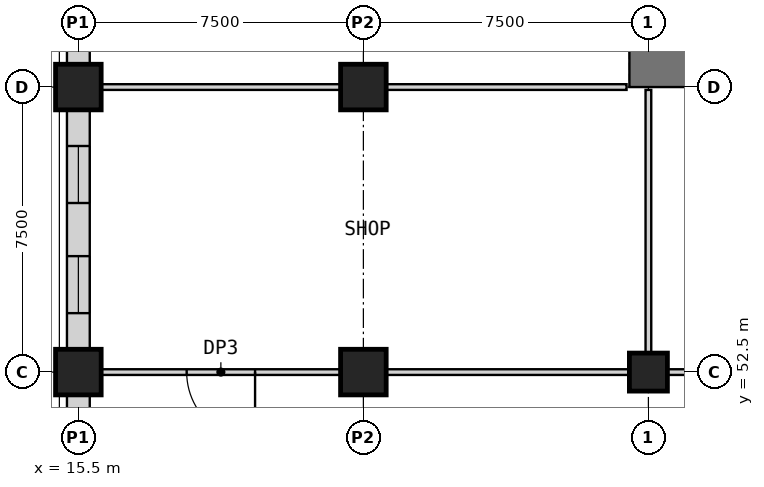
"""IFC4 building model, lengths in metres.
Left out: names, types, materials, properties, quantities, classifications, styles, units other than length and angle.
Written with IfcOpenShell. Run it as: python <this file> out.ifc"""

import sys

from ifc_helpers import new_model, si_unit, direction, frame, frame_2d, origin, origin_2d, place, context, subcontext, project, spatial, rectangle, extrude, element, fill, save


model = new_model("IFC4")
c1 = context("Model", 3, precision=1e-05, world=origin(), true_north=direction((0.0, 1.0)))
c2 = subcontext(c1, "Body", "Model", "MODEL_VIEW")
j1 = project(units=[si_unit("LENGTHUNIT", "METRE"), si_unit("PLANEANGLEUNIT", "RADIAN")], contexts=[c1])
p1 = place(None, origin())
s1 = spatial("IfcSite", under=j1, at=p1, CompositionType="ELEMENT")
p2 = place(p1, origin())
s2 = spatial("IfcBuilding", under=s1, at=p2, CompositionType="ELEMENT")
p3 = place(p2, frame((0.0, 0.0, 8.0)))
s3 = spatial("IfcBuildingStorey", under=s2, at=p3, CompositionType="ELEMENT", Elevation=8.0)
p4 = place(p3, frame((30.5, 52.5, 0.0), z_axis=(0.0, 0.0, 1.0), x_axis=(1.0, 0.0, 0.0)))
e1 = element("IfcColumn", 1, at=p4, inside=s3, PredefinedType="COLUMN", context=c2, shape_type="SweptSolid", body=[
    extrude(rectangle(XDim=1.0, YDim=1.0, at=origin_2d()), origin(), (0.0, 0.0, 1.0), 5.5),
])
for number, where, z_axis, x_axis in (
    (2, (15.5, 52.5, 0.0), (0.0, 0.0, 1.0), (1.0, 0.0, 0.0)),
    (3, (15.5, 60.0, 0.0), (0.0, 0.0, 1.0), (1.0, 0.0, 0.0)),
    (4, (23.0, 52.5, 0.0), (0.0, 0.0, 1.0), (1.0, 0.0, 0.0)),
    (5, (23.0, 60.0, 0.0), (0.0, 0.0, 1.0), (1.0, 0.0, 0.0)),
):
    element("IfcColumn", number, at=place(p3, frame(where, z_axis=z_axis, x_axis=x_axis)), inside=s3, PredefinedType="COLUMN", context=c2, shape_type="SweptSolid", body=[
        extrude(rectangle(XDim=1.2, YDim=1.2, at=origin_2d()), origin(), (0.0, 0.0, 1.0), 5.5),
    ])
p5 = place(p3, frame((30.0, 60.5, 0.0), z_axis=(0.0, 0.0, 1.0), x_axis=(1.0, 0.0, 0.0)))
e6 = element("IfcWall", 6, at=p5, inside=s3, PredefinedType="SHEAR", context=c2, shape_type="SweptSolid", body=[
    extrude(rectangle(XDim=30.0, YDim=1.0, at=frame_2d((15.0, 0.0))), origin(), (0.0, 0.0, 1.0), 5.5),
])
p6 = place(p5, frame((21.9, 0.0, 0.0)))
e7 = element("IfcOpeningElement", 7, at=p6, cuts=e6, PredefinedType="OPENING", context=c2, shape_type="SweptSolid", body=[
    extrude(rectangle(XDim=1.8, YDim=2.1, at=frame_2d((0.9, 1.05))), frame((0.0, 0.51, 0.0), z_axis=(0.0, -1.0, 0.0), x_axis=(1.0, 0.0, 0.0)), (0.0, 0.0, 1.0), 1.02),
])
p7 = place(p5, frame((26.5, 0.0, 0.0)))
e8 = element("IfcOpeningElement", 8, at=p7, cuts=e6, PredefinedType="OPENING", context=c2, shape_type="SweptSolid", body=[
    extrude(rectangle(XDim=1.2, YDim=2.1, at=frame_2d((0.6, 1.05))), frame((0.0, 0.51, 0.0), z_axis=(0.0, -1.0, 0.0), x_axis=(1.0, 0.0, 0.0)), (0.0, 0.0, 1.0), 1.02),
])
p8 = place(p3, frame((22.4, 52.5, 0.0), z_axis=(0.0, 0.0, 1.0), x_axis=(-1.0, 0.0, 0.0)))
e9 = element("IfcWall", 9, at=p8, inside=s3, PredefinedType="PARTITIONING", context=c2, shape_type="SweptSolid", body=[
    extrude(rectangle(XDim=6.3, YDim=0.15, at=frame_2d((3.15, 0.0))), origin(), (0.0, 0.0, 1.0), 5.2),
])
p9 = place(p8, frame((2.25, 0.0, 0.0)))
e10 = element("IfcOpeningElement", 10, at=p9, cuts=e9, PredefinedType="OPENING", context=c2, shape_type="SweptSolid", body=[
    extrude(rectangle(XDim=1.8, YDim=2.4, at=frame_2d((0.9, 1.2))), frame((0.0, 0.085, 0.0), z_axis=(0.0, -1.0, 0.0), x_axis=(1.0, 0.0, 0.0)), (0.0, 0.0, 1.0), 0.17),
])
p10 = place(p3, frame((23.6, 52.5, 0.0), z_axis=(0.0, 0.0, 1.0), x_axis=(1.0, 0.0, 0.0)))
e11 = element("IfcWall", 11, at=p10, inside=s3, PredefinedType="PARTITIONING", context=c2, shape_type="SweptSolid", body=[
    extrude(rectangle(XDim=6.4, YDim=0.15, at=frame_2d((3.2, 0.0))), origin(), (0.0, 0.0, 1.0), 5.2),
])
p11 = place(p3, frame((31.0, 52.5, 0.0), z_axis=(0.0, 0.0, 1.0), x_axis=(1.0, 0.0, 0.0)))
e12 = element("IfcWall", 12, at=p11, inside=s3, PredefinedType="PARTITIONING", context=c2, shape_type="SweptSolid", body=[
    extrude(rectangle(XDim=5.9, YDim=0.15, at=frame_2d((2.95, 0.0))), origin(), (0.0, 0.0, 1.0), 5.2),
])
p12 = place(p3, frame((16.1, 60.0, 0.0), z_axis=(0.0, 0.0, 1.0), x_axis=(1.0, 0.0, 0.0)))
e13 = element("IfcWall", 13, at=p12, inside=s3, PredefinedType="PARTITIONING", context=c2, shape_type="SweptSolid", body=[
    extrude(rectangle(XDim=6.3, YDim=0.15, at=frame_2d((3.15, 0.0))), origin(), (0.0, 0.0, 1.0), 5.2),
])
p13 = place(p3, frame((23.6, 60.0, 0.0), z_axis=(0.0, 0.0, 1.0), x_axis=(1.0, 0.0, 0.0)))
e14 = element("IfcWall", 14, at=p13, inside=s3, PredefinedType="PARTITIONING", context=c2, shape_type="SweptSolid", body=[
    extrude(rectangle(XDim=6.325, YDim=0.15, at=frame_2d((3.163, 0.0))), origin(), (0.0, 0.0, 1.0), 5.2),
])
p14 = place(p3, frame((15.5, 46.1, 0.0), z_axis=(0.0, 0.0, 1.0), x_axis=(0.0, 1.0, 0.0)))
e15 = element("IfcWall", 15, at=p14, inside=s3, PredefinedType="PARTITIONING", context=c2, shape_type="SweptSolid", body=[
    extrude(rectangle(XDim=5.8, YDim=0.6, at=frame_2d((2.9, 0.0))), origin(), (0.0, 0.0, 1.0), 4.6),
])
p15 = place(p14, frame((0.816, 0.0, 0.9)))
e16 = element("IfcOpeningElement", 16, at=p15, cuts=e15, PredefinedType="OPENING", context=c2, shape_type="SweptSolid", body=[
    extrude(rectangle(XDim=1.5, YDim=2.8, at=frame_2d((0.75, 1.4))), frame((0.0, 0.31, 0.0), z_axis=(0.0, -1.0, 0.0), x_axis=(1.0, 0.0, 0.0)), (0.0, 0.0, 1.0), 0.62),
])
p16 = place(p14, frame((3.484, 0.0, 0.9)))
e17 = element("IfcOpeningElement", 17, at=p16, cuts=e15, PredefinedType="OPENING", context=c2, shape_type="SweptSolid", body=[
    extrude(rectangle(XDim=1.5, YDim=2.8, at=frame_2d((0.75, 1.4))), frame((0.0, 0.31, 0.0), z_axis=(0.0, -1.0, 0.0), x_axis=(1.0, 0.0, 0.0)), (0.0, 0.0, 1.0), 0.62),
])
p17 = place(p3, frame((15.5, 53.1, 0.0), z_axis=(0.0, 0.0, 1.0), x_axis=(0.0, 1.0, 0.0)))
e18 = element("IfcWall", 18, at=p17, inside=s3, PredefinedType="PARTITIONING", context=c2, shape_type="SweptSolid", body=[
    extrude(rectangle(XDim=6.3, YDim=0.6, at=frame_2d((3.15, 0.0))), origin(), (0.0, 0.0, 1.0), 4.6),
])
p18 = place(p17, frame((0.951, 0.0, 0.9)))
e19 = element("IfcOpeningElement", 19, at=p18, cuts=e18, PredefinedType="OPENING", context=c2, shape_type="SweptSolid", body=[
    extrude(rectangle(XDim=1.5, YDim=2.8, at=frame_2d((0.75, 1.4))), frame((0.0, 0.31, 0.0), z_axis=(0.0, -1.0, 0.0), x_axis=(1.0, 0.0, 0.0)), (0.0, 0.0, 1.0), 0.62),
])
p19 = place(p17, frame((3.849, 0.0, 0.9)))
e20 = element("IfcOpeningElement", 20, at=p19, cuts=e18, PredefinedType="OPENING", context=c2, shape_type="SweptSolid", body=[
    extrude(rectangle(XDim=1.5, YDim=2.8, at=frame_2d((0.75, 1.4))), frame((0.0, 0.31, 0.0), z_axis=(0.0, -1.0, 0.0), x_axis=(1.0, 0.0, 0.0)), (0.0, 0.0, 1.0), 0.62),
])
p20 = place(p3, frame((15.5, 60.6, 0.0), z_axis=(0.0, 0.0, 1.0), x_axis=(0.0, 1.0, 0.0)))
e21 = element("IfcWall", 21, at=p20, inside=s3, PredefinedType="PARTITIONING", context=c2, shape_type="SweptSolid", body=[
    extrude(rectangle(XDim=6.3, YDim=0.6, at=frame_2d((3.15, 0.0))), origin(), (0.0, 0.0, 1.0), 4.6),
])
p21 = place(p20, frame((0.951, 0.0, 0.9)))
e22 = element("IfcOpeningElement", 22, at=p21, cuts=e21, PredefinedType="OPENING", context=c2, shape_type="SweptSolid", body=[
    extrude(rectangle(XDim=1.5, YDim=2.8, at=frame_2d((0.75, 1.4))), frame((0.0, 0.31, 0.0), z_axis=(0.0, -1.0, 0.0), x_axis=(1.0, 0.0, 0.0)), (0.0, 0.0, 1.0), 0.62),
])
p22 = place(p20, frame((3.849, 0.0, 0.9)))
e23 = element("IfcOpeningElement", 23, at=p22, cuts=e21, PredefinedType="OPENING", context=c2, shape_type="SweptSolid", body=[
    extrude(rectangle(XDim=1.5, YDim=2.8, at=frame_2d((0.75, 1.4))), frame((0.0, 0.31, 0.0), z_axis=(0.0, -1.0, 0.0), x_axis=(1.0, 0.0, 0.0)), (0.0, 0.0, 1.0), 0.62),
])
p23 = place(p3, frame((30.5, 53.0, 0.0), z_axis=(0.0, 0.0, 1.0), x_axis=(0.0, 1.0, 0.0)))
e24 = element("IfcWall", 24, at=p23, inside=s3, PredefinedType="PARTITIONING", context=c2, shape_type="SweptSolid", body=[
    extrude(rectangle(XDim=6.925, YDim=0.15, at=frame_2d((3.462, 0.0))), origin(), (0.0, 0.0, 1.0), 5.2),
])
p24 = place(p9, origin())
e25 = element("IfcDoor", 25, at=p24, inside=s3, OperationType="SINGLE_SWING_LEFT", PredefinedType="DOOR", context=c2, shape_type="SweptSolid", body=[
    extrude(rectangle(XDim=1.8, YDim=2.4, at=frame_2d((0.9, 1.2))), frame((0.0, 0.025, 0.0), z_axis=(0.0, -1.0, 0.0), x_axis=(1.0, 0.0, 0.0)), (0.0, 0.0, 1.0), 0.05),
])
fill(e10, e25)
p25 = place(p18, origin())
e26 = element("IfcWindow", 26, at=p25, inside=s3, PartitioningType="SINGLE_PANEL", PredefinedType="WINDOW", context=c2, shape_type="SweptSolid", body=[
    extrude(rectangle(XDim=1.5, YDim=2.8, at=frame_2d((0.75, 1.4))), frame((0.0, 0.03, 0.0), z_axis=(0.0, -1.0, 0.0), x_axis=(1.0, 0.0, 0.0)), (0.0, 0.0, 1.0), 0.06),
])
fill(e19, e26)
p26 = place(p19, origin())
e27 = element("IfcWindow", 27, at=p26, inside=s3, PartitioningType="SINGLE_PANEL", PredefinedType="WINDOW", context=c2, shape_type="SweptSolid", body=[
    extrude(rectangle(XDim=1.5, YDim=2.8, at=frame_2d((0.75, 1.4))), frame((0.0, 0.03, 0.0), z_axis=(0.0, -1.0, 0.0), x_axis=(1.0, 0.0, 0.0)), (0.0, 0.0, 1.0), 0.06),
])
fill(e20, e27)
save(model, sys.argv[1])
